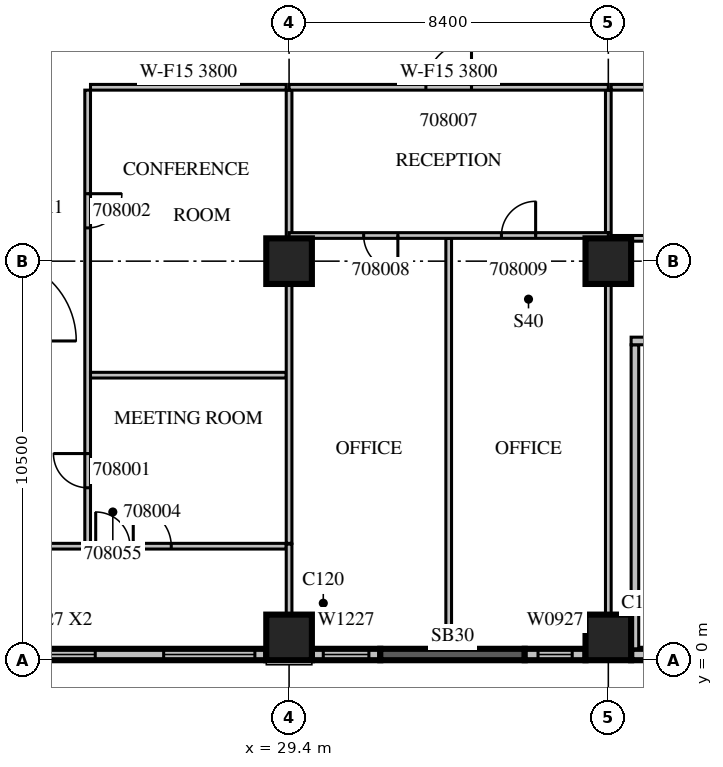
"""IFC4 building model, lengths in metres.
Left out: names, types, materials, properties, quantities, classifications, styles, units other than length and angle.
Written with IfcOpenShell. Run it as: python <this file> out.ifc"""

import sys

from ifc_helpers import new_model, si_unit, direction, frame, frame_2d, origin, origin_2d, place, context, subcontext, project, spatial, rectangle, extrude, source, transform, mapped, element, fill, save


model = new_model("IFC4")
c1 = context("Model", 3, precision=1e-05, world=origin(), true_north=direction((0.0, 1.0)))
c2 = subcontext(c1, "Body", "Model", "MODEL_VIEW")
j1 = project(units=[si_unit("LENGTHUNIT", "METRE"), si_unit("PLANEANGLEUNIT", "RADIAN")], contexts=[c1])
p1 = place(None, origin())
s1 = spatial("IfcSite", under=j1, at=p1, CompositionType="ELEMENT")
p2 = place(p1, origin())
s2 = spatial("IfcBuilding", under=s1, at=p2, CompositionType="ELEMENT")
p3 = place(p2, frame((0.0, 0.0, 44.7)))
s3 = spatial("IfcBuildingStorey", under=s2, at=p3, CompositionType="ELEMENT", Elevation=44.7)
m1 = source(origin(), c2, "Body", "SweptSolid", [
    extrude(rectangle(XDim=1.2, YDim=1.2, at=origin_2d()), origin(), (0.0, 0.0, 1.0), 4.2),
])
for number, where, z_axis, x_axis in (
    (1, (29.4, 0.6, 0.0), (0.0, 0.0, 1.0), (1.0, 0.0, 0.0)),
    (2, (37.8, 0.6, 0.0), (0.0, 0.0, 1.0), (1.0, 0.0, 0.0)),
    (3, (29.4, 10.5, 0.0), (0.0, 0.0, 1.0), (1.0, 0.0, 0.0)),
    (4, (37.8, 10.5, 0.0), (0.0, 0.0, 1.0), (1.0, 0.0, 0.0)),
):
    element("IfcColumn", number, at=place(p3, frame(where, z_axis=z_axis, x_axis=x_axis)), inside=s3, PredefinedType="COLUMN", context=c2, shape_type="MappedRepresentation", body=[
        mapped(m1, transform((0.0, 0.0, 0.0), scale=1.0)),
    ])
m2 = source(origin(), c2, "Body", "SweptSolid", [
    extrude(rectangle(XDim=7.2, YDim=0.3, at=frame_2d((3.6, 0.0))), origin(), (0.0, 0.0, 1.0), 3.8),
])
p4 = place(p3, frame((21.6, 0.15, 0.0), z_axis=(0.0, 0.0, 1.0), x_axis=(1.0, 0.0, 0.0)))
e5 = element("IfcWall", 5, at=p4, inside=s3, PredefinedType="STANDARD", context=c2, shape_type="MappedRepresentation", body=[
    mapped(m2, transform((0.0, 0.0, 0.0), scale=1.0)),
])
m3 = source(origin(), c2, "Body", "SweptSolid", [
    extrude(rectangle(XDim=2.4, YDim=2.7, at=frame_2d((1.2, 1.35))), frame((0.0, 0.16, 0.0), z_axis=(0.0, -1.0, 0.0), x_axis=(1.0, 0.0, 0.0)), (0.0, 0.0, 1.0), 0.32),
])
p5 = place(p4, frame((0.3, 0.0, 0.6)))
e6 = element("IfcOpeningElement", 6, at=p5, cuts=e5, PredefinedType="OPENING", context=c2, shape_type="MappedRepresentation", body=[
    mapped(m3, transform((0.0, 0.0, 0.0), scale=1.0)),
])
p6 = place(p4, frame((4.5, 0.0, 0.6)))
e7 = element("IfcOpeningElement", 7, at=p6, cuts=e5, PredefinedType="OPENING", context=c2, shape_type="MappedRepresentation", body=[
    mapped(m3, transform((0.0, 0.0, 0.0), scale=1.0)),
])
m4 = source(origin(), c2, "Body", "SweptSolid", [
    extrude(rectangle(XDim=1.8, YDim=0.3, at=frame_2d((0.9, 0.0))), origin(), (0.0, 0.0, 1.0), 3.8),
])
p7 = place(p3, frame((30.0, 0.15, 0.0), z_axis=(0.0, 0.0, 1.0), x_axis=(1.0, 0.0, 0.0)))
e8 = element("IfcWall", 8, at=p7, inside=s3, PredefinedType="STANDARD", context=c2, shape_type="MappedRepresentation", body=[
    mapped(m4, transform((0.0, 0.0, 0.0), scale=1.0)),
])
m5 = source(origin(), c2, "Body", "SweptSolid", [
    extrude(rectangle(XDim=1.2, YDim=2.7, at=frame_2d((0.6, 1.35))), frame((0.0, 0.16, 0.0), z_axis=(0.0, -1.0, 0.0), x_axis=(1.0, 0.0, 0.0)), (0.0, 0.0, 1.0), 0.32),
])
p8 = place(p7, frame((0.3, 0.0, 0.6)))
e9 = element("IfcOpeningElement", 9, at=p8, cuts=e8, PredefinedType="OPENING", context=c2, shape_type="MappedRepresentation", body=[
    mapped(m5, transform((0.0, 0.0, 0.0), scale=1.0)),
])
m6 = source(origin(), c2, "Body", "SweptSolid", [
    extrude(rectangle(XDim=3.8, YDim=0.3, at=frame_2d((1.9, 0.0))), origin(), (0.0, 0.0, 1.0), 3.8),
])
p9 = place(p3, frame((31.8, 0.15, 0.0), z_axis=(0.0, 0.0, 1.0), x_axis=(1.0, 0.0, 0.0)))
e10 = element("IfcWall", 10, at=p9, inside=s3, PredefinedType="SOLIDWALL", context=c2, shape_type="MappedRepresentation", body=[
    mapped(m6, transform((0.0, 0.0, 0.0), scale=1.0)),
])
m7 = source(origin(), c2, "Body", "SweptSolid", [
    extrude(rectangle(XDim=1.6, YDim=0.3, at=frame_2d((0.8, 0.0))), origin(), (0.0, 0.0, 1.0), 3.8),
])
p10 = place(p3, frame((35.6, 0.15, 0.0), z_axis=(0.0, 0.0, 1.0), x_axis=(1.0, 0.0, 0.0)))
e11 = element("IfcWall", 11, at=p10, inside=s3, PredefinedType="STANDARD", context=c2, shape_type="MappedRepresentation", body=[
    mapped(m7, transform((0.0, 0.0, 0.0), scale=1.0)),
])
m8 = source(origin(), c2, "Body", "SweptSolid", [
    extrude(rectangle(XDim=0.9, YDim=2.7, at=frame_2d((0.45, 1.35))), frame((0.0, 0.16, 0.0), z_axis=(0.0, -1.0, 0.0), x_axis=(1.0, 0.0, 0.0)), (0.0, 0.0, 1.0), 0.32),
])
p11 = place(p10, frame((0.35, 0.0, 0.6)))
e12 = element("IfcOpeningElement", 12, at=p11, cuts=e11, PredefinedType="OPENING", context=c2, shape_type="MappedRepresentation", body=[
    mapped(m8, transform((0.0, 0.0, 0.0), scale=1.0)),
])
p12 = place(p3, frame((38.4, 0.15, 0.0), z_axis=(0.0, 0.0, 1.0), x_axis=(1.0, 0.0, 0.0)))
e13 = element("IfcWall", 13, at=p12, inside=s3, PredefinedType="STANDARD", context=c2, shape_type="MappedRepresentation", body=[
    mapped(m4, transform((0.0, 0.0, 0.0), scale=1.0)),
])
m9 = source(origin(), c2, "Body", "SweptSolid", [
    extrude(rectangle(XDim=8.0, YDim=0.2, at=frame_2d((4.0, 0.0))), origin(), (0.0, 0.0, 1.0), 3.8),
])
p13 = place(p3, frame((38.5, 0.3, 0.0), z_axis=(0.0, 0.0, 1.0), x_axis=(0.0, 1.0, 0.0)))
e14 = element("IfcWall", 14, at=p13, inside=s3, PredefinedType="PARTITIONING", context=c2, shape_type="MappedRepresentation", body=[
    mapped(m9, transform((0.0, 0.0, 0.0), scale=1.0)),
])
m10 = source(origin(), c2, "Body", "SweptSolid", [
    extrude(rectangle(XDim=5.45, YDim=0.2, at=frame_2d((2.725, 0.0))), origin(), (0.0, 0.0, 1.0), 3.8),
])
p14 = place(p3, frame((38.4, 8.4, 0.0), z_axis=(0.0, 0.0, 1.0), x_axis=(1.0, 0.0, 0.0)))
e15 = element("IfcWall", 15, at=p14, inside=s3, PredefinedType="PARTITIONING", context=c2, shape_type="MappedRepresentation", body=[
    mapped(m10, transform((0.0, 0.0, 0.0), scale=1.0)),
])
m11 = source(origin(), c2, "Body", "SweptSolid", [
    extrude(rectangle(XDim=1.2, YDim=2.1, at=frame_2d((0.6, 1.05))), frame((0.0, 0.11, 0.0), z_axis=(0.0, -1.0, 0.0), x_axis=(1.0, 0.0, 0.0)), (0.0, 0.0, 1.0), 0.22),
])
p15 = place(p14, frame((0.4, 0.0, 0.0)))
e16 = element("IfcOpeningElement", 16, at=p15, cuts=e15, PredefinedType="OPENING", context=c2, shape_type="MappedRepresentation", body=[
    mapped(m11, transform((0.0, 0.0, 0.0), scale=1.0)),
])
m12 = source(origin(), c2, "Body", "SweptSolid", [
    extrude(rectangle(XDim=0.9, YDim=2.1, at=frame_2d((0.45, 1.05))), frame((0.0, 0.11, 0.0), z_axis=(0.0, -1.0, 0.0), x_axis=(1.0, 0.0, 0.0)), (0.0, 0.0, 1.0), 0.22),
])
p16 = place(p14, frame((3.25, 0.0, 0.0)))
e17 = element("IfcOpeningElement", 17, at=p16, cuts=e15, PredefinedType="OPENING", context=c2, shape_type="MappedRepresentation", body=[
    mapped(m12, transform((0.0, 0.0, 0.0), scale=1.0)),
])
m13 = source(origin(), c2, "Body", "SweptSolid", [
    extrude(rectangle(XDim=11.925, YDim=0.15, at=frame_2d((5.963, 0.0))), origin(), (0.0, 0.0, 1.0), 3.8),
])
p17 = place(p3, frame((24.1, 15.0, 0.0), z_axis=(0.0, 0.0, 1.0), x_axis=(0.0, -1.0, 0.0)))
e18 = element("IfcWall", 18, at=p17, inside=s3, PredefinedType="PARTITIONING", context=c2, shape_type="MappedRepresentation", body=[
    mapped(m13, transform((0.0, 0.0, 0.0), scale=1.0)),
])
m14 = source(origin(), c2, "Body", "SweptSolid", [
    extrude(rectangle(XDim=0.9, YDim=2.1, at=frame_2d((0.45, 1.05))), frame((0.0, 0.085, 0.0), z_axis=(0.0, -1.0, 0.0), x_axis=(1.0, 0.0, 0.0)), (0.0, 0.0, 1.0), 0.17),
])
p18 = place(p17, frame((9.562, 0.0, 0.0)))
e19 = element("IfcOpeningElement", 19, at=p18, cuts=e18, PredefinedType="OPENING", context=c2, shape_type="MappedRepresentation", body=[
    mapped(m14, transform((0.0, 0.0, 0.0), scale=1.0)),
])
p19 = place(p17, frame((2.725, 0.0, 0.0)))
e20 = element("IfcOpeningElement", 20, at=p19, cuts=e18, PredefinedType="OPENING", context=c2, shape_type="MappedRepresentation", body=[
    mapped(m14, transform((0.0, 0.0, 0.0), scale=1.0)),
])
m15 = source(origin(), c2, "Body", "SweptSolid", [
    extrude(rectangle(XDim=5.15, YDim=0.15, at=frame_2d((2.575, 0.0))), origin(), (0.0, 0.0, 1.0), 3.8),
])
for number, where, z_axis, x_axis in (
    (21, (29.325, 7.5, 0.0), (0.0, 0.0, 1.0), (-1.0, 0.0, 0.0)),
    (22, (29.325, 15.075, 0.0), (0.0, 0.0, 1.0), (-1.0, 0.0, 0.0)),
):
    element("IfcWall", number, at=place(p3, frame(where, z_axis=z_axis, x_axis=x_axis)), inside=s3, PredefinedType="PARTITIONING", context=c2, shape_type="MappedRepresentation", body=[
        mapped(m15, transform((0.0, 0.0, 0.0), scale=1.0)),
    ])
m16 = source(origin(), c2, "Body", "SweptSolid", [
    extrude(rectangle(XDim=6.826, YDim=0.15, at=frame_2d((3.413, 0.0))), origin(), (0.0, 0.0, 1.0), 3.8),
])
p20 = place(p3, frame((29.4, 3.075, 0.0), z_axis=(0.0, 0.0, 1.0), x_axis=(0.0, 1.0, 0.0)))
e23 = element("IfcWall", 23, at=p20, inside=s3, PredefinedType="PARTITIONING", context=c2, shape_type="MappedRepresentation", body=[
    mapped(m16, transform((0.0, 0.0, 0.0), scale=1.0)),
])
m17 = source(origin(), c2, "Body", "SweptSolid", [
    extrude(rectangle(XDim=3.901, YDim=0.15, at=frame_2d((1.95, 0.0))), origin(), (0.0, 0.0, 1.0), 3.8),
])
p21 = place(p3, frame((29.4, 11.099, 0.0), z_axis=(0.0, 0.0, 1.0), x_axis=(0.0, 1.0, 0.0)))
e24 = element("IfcWall", 24, at=p21, inside=s3, PredefinedType="PARTITIONING", context=c2, shape_type="MappedRepresentation", body=[
    mapped(m17, transform((0.0, 0.0, 0.0), scale=1.0)),
])
m18 = source(origin(), c2, "Body", "SweptSolid", [
    extrude(rectangle(XDim=7.125, YDim=0.15, at=frame_2d((3.562, 0.0))), origin(), (0.0, 0.0, 1.0), 3.8),
])
p22 = place(p3, frame((22.2, 3.0, 0.0), z_axis=(0.0, 0.0, 1.0), x_axis=(1.0, 0.0, 0.0)))
e25 = element("IfcWall", 25, at=p22, inside=s3, PredefinedType="PARTITIONING", context=c2, shape_type="MappedRepresentation", body=[
    mapped(m18, transform((0.0, 0.0, 0.0), scale=1.0)),
])
m19 = source(origin(), c2, "Body", "SweptSolid", [
    extrude(rectangle(XDim=1.0, YDim=2.1, at=frame_2d((0.5, 1.05))), frame((0.0, 0.085, 0.0), z_axis=(0.0, -1.0, 0.0), x_axis=(1.0, 0.0, 0.0)), (0.0, 0.0, 1.0), 0.17),
])
p23 = place(p22, frame((3.1, 0.0, 0.0)))
e26 = element("IfcOpeningElement", 26, at=p23, cuts=e25, PredefinedType="OPENING", context=c2, shape_type="MappedRepresentation", body=[
    mapped(m19, transform((0.0, 0.0, 0.0), scale=1.0)),
])
p24 = place(p22, frame((2.112, 0.0, 0.0)))
e27 = element("IfcOpeningElement", 27, at=p24, cuts=e25, PredefinedType="OPENING", context=c2, shape_type="MappedRepresentation", body=[
    mapped(m14, transform((0.0, 0.0, 0.0), scale=1.0)),
])
m20 = source(origin(), c2, "Body", "SweptSolid", [
    extrude(rectangle(XDim=6.45, YDim=0.15, at=frame_2d((3.225, 0.0))), origin(), (0.0, 0.0, 1.0), 3.8),
])
p25 = place(p3, frame((37.875, 11.1, 0.0), z_axis=(0.0, 0.0, 1.0), x_axis=(1.0, 0.0, 0.0)))
e28 = element("IfcWall", 28, at=p25, inside=s3, PredefinedType="PARTITIONING", context=c2, shape_type="MappedRepresentation", body=[
    mapped(m20, transform((0.0, 0.0, 0.0), scale=1.0)),
])
p26 = place(p3, frame((44.325, 15.075, 0.0), z_axis=(0.0, 0.0, 1.0), x_axis=(-1.0, 0.0, 0.0)))
e29 = element("IfcWall", 29, at=p26, inside=s3, PredefinedType="PARTITIONING", context=c2, shape_type="MappedRepresentation", body=[
    mapped(m20, transform((0.0, 0.0, 0.0), scale=1.0)),
])
p27 = place(p26, frame((2.812, 0.0, 0.0)))
e30 = element("IfcOpeningElement", 30, at=p27, cuts=e29, PredefinedType="OPENING", context=c2, shape_type="MappedRepresentation", body=[
    mapped(m14, transform((0.0, 0.0, 0.0), scale=1.0)),
])
m21 = source(origin(), c2, "Body", "SweptSolid", [
    extrude(rectangle(XDim=10.8, YDim=0.15, at=frame_2d((5.4, 0.0))), origin(), (0.0, 0.0, 1.0), 3.8),
])
p28 = place(p3, frame((33.6, 0.3, 0.0), z_axis=(0.0, 0.0, 1.0), x_axis=(0.0, 1.0, 0.0)))
e31 = element("IfcWall", 31, at=p28, inside=s3, PredefinedType="PARTITIONING", context=c2, shape_type="MappedRepresentation", body=[
    mapped(m21, transform((0.0, 0.0, 0.0), scale=1.0)),
])
m22 = source(origin(), c2, "Body", "SweptSolid", [
    extrude(rectangle(XDim=1.856, YDim=0.15, at=frame_2d((0.928, 0.0))), origin(), (0.0, 0.0, 1.0), 3.8),
])
p29 = place(p3, frame((29.4, 1.199, 0.0), z_axis=(0.0, 0.0, 1.0), x_axis=(0.0, 1.0, 0.0)))
e32 = element("IfcWall", 32, at=p29, inside=s3, PredefinedType="PARTITIONING", context=c2, shape_type="MappedRepresentation", body=[
    mapped(m22, transform((0.0, 0.0, 0.0), scale=1.0)),
])
m23 = source(origin(), c2, "Body", "SweptSolid", [
    extrude(rectangle(XDim=8.702, YDim=0.15, at=frame_2d((4.351, 0.0))), origin(), (0.0, 0.0, 1.0), 3.8),
])
p30 = place(p3, frame((37.8, 1.199, 0.0), z_axis=(0.0, 0.0, 1.0), x_axis=(0.0, 1.0, 0.0)))
e33 = element("IfcWall", 33, at=p30, inside=s3, PredefinedType="PARTITIONING", context=c2, shape_type="MappedRepresentation", body=[
    mapped(m23, transform((0.0, 0.0, 0.0), scale=1.0)),
])
m24 = source(origin(), c2, "Body", "SweptSolid", [
    extrude(rectangle(XDim=3.75, YDim=0.15, at=frame_2d((1.875, 0.0))), origin(), (0.0, 0.0, 1.0), 3.8),
])
p31 = place(p3, frame((37.8, 11.25, 0.0), z_axis=(0.0, 0.0, 1.0), x_axis=(0.0, 1.0, 0.0)))
e34 = element("IfcWall", 34, at=p31, inside=s3, PredefinedType="PARTITIONING", context=c2, shape_type="MappedRepresentation", body=[
    mapped(m24, transform((0.0, 0.0, 0.0), scale=1.0)),
])
m25 = source(origin(), c2, "Body", "SweptSolid", [
    extrude(rectangle(XDim=8.4, YDim=0.15, at=frame_2d((4.2, 0.0))), origin(), (0.0, 0.0, 1.0), 3.8),
])
p32 = place(p3, frame((37.8, 11.175, 0.0), z_axis=(0.0, 0.0, 1.0), x_axis=(-1.0, 0.0, 0.0)))
e35 = element("IfcWall", 35, at=p32, inside=s3, PredefinedType="PARTITIONING", context=c2, shape_type="MappedRepresentation", body=[
    mapped(m25, transform((0.0, 0.0, 0.0), scale=1.0)),
])
p33 = place(p32, frame((5.537, 0.0, 0.0)))
e36 = element("IfcOpeningElement", 36, at=p33, cuts=e35, PredefinedType="OPENING", context=c2, shape_type="MappedRepresentation", body=[
    mapped(m14, transform((0.0, 0.0, 0.0), scale=1.0)),
])
p34 = place(p32, frame((1.913, 0.0, 0.0)))
e37 = element("IfcOpeningElement", 37, at=p34, cuts=e35, PredefinedType="OPENING", context=c2, shape_type="MappedRepresentation", body=[
    mapped(m14, transform((0.0, 0.0, 0.0), scale=1.0)),
])
p35 = place(p3, frame((37.8, 15.075, 0.0), z_axis=(0.0, 0.0, 1.0), x_axis=(-1.0, 0.0, 0.0)))
e38 = element("IfcWall", 38, at=p35, inside=s3, PredefinedType="PARTITIONING", context=c2, shape_type="MappedRepresentation", body=[
    mapped(m25, transform((0.0, 0.0, 0.0), scale=1.0)),
])
m26 = source(origin(), c2, "Body", "SweptSolid", [
    extrude(rectangle(XDim=1.2, YDim=2.1, at=frame_2d((0.6, 1.05))), frame((0.0, 0.085, 0.0), z_axis=(0.0, -1.0, 0.0), x_axis=(1.0, 0.0, 0.0)), (0.0, 0.0, 1.0), 0.17),
])
p36 = place(p35, frame((3.6, 0.0, 0.0)))
e39 = element("IfcOpeningElement", 39, at=p36, cuts=e38, PredefinedType="OPENING", context=c2, shape_type="MappedRepresentation", body=[
    mapped(m26, transform((0.0, 0.0, 0.0), scale=1.0)),
])
m27 = source(origin(), c2, "Body", "SweptSolid", [
    extrude(rectangle(XDim=2.4, YDim=2.7, at=frame_2d((1.2, 1.35))), frame((0.0, 0.03, 0.0), z_axis=(0.0, -1.0, 0.0), x_axis=(1.0, 0.0, 0.0)), (0.0, 0.0, 1.0), 0.06),
])
p37 = place(p5, origin())
e40 = element("IfcWindow", 40, at=p37, inside=s3, PartitioningType="SINGLE_PANEL", PredefinedType="WINDOW", context=c2, shape_type="MappedRepresentation", body=[
    mapped(m27, transform((0.0, 0.0, 0.0), scale=1.0)),
])
fill(e6, e40)
p38 = place(p6, origin())
e41 = element("IfcWindow", 41, at=p38, inside=s3, PartitioningType="SINGLE_PANEL", PredefinedType="WINDOW", context=c2, shape_type="MappedRepresentation", body=[
    mapped(m27, transform((0.0, 0.0, 0.0), scale=1.0)),
])
fill(e7, e41)
m28 = source(origin(), c2, "Body", "SweptSolid", [
    extrude(rectangle(XDim=1.2, YDim=2.7, at=frame_2d((0.6, 1.35))), frame((0.0, 0.03, 0.0), z_axis=(0.0, -1.0, 0.0), x_axis=(1.0, 0.0, 0.0)), (0.0, 0.0, 1.0), 0.06),
])
p39 = place(p8, origin())
e42 = element("IfcWindow", 42, at=p39, inside=s3, PartitioningType="SINGLE_PANEL", PredefinedType="WINDOW", context=c2, shape_type="MappedRepresentation", body=[
    mapped(m28, transform((0.0, 0.0, 0.0), scale=1.0)),
])
fill(e9, e42)
m29 = source(origin(), c2, "Body", "SweptSolid", [
    extrude(rectangle(XDim=0.9, YDim=2.7, at=frame_2d((0.45, 1.35))), frame((0.0, 0.03, 0.0), z_axis=(0.0, -1.0, 0.0), x_axis=(1.0, 0.0, 0.0)), (0.0, 0.0, 1.0), 0.06),
])
p40 = place(p11, origin())
e43 = element("IfcWindow", 43, at=p40, inside=s3, PartitioningType="SINGLE_PANEL", PredefinedType="WINDOW", context=c2, shape_type="MappedRepresentation", body=[
    mapped(m29, transform((0.0, 0.0, 0.0), scale=1.0)),
])
fill(e12, e43)
m30 = source(origin(), c2, "Body", "SweptSolid", [
    extrude(rectangle(XDim=0.9, YDim=2.1, at=frame_2d((0.45, 1.05))), frame((0.0, 0.025, 0.0), z_axis=(0.0, -1.0, 0.0), x_axis=(1.0, 0.0, 0.0)), (0.0, 0.0, 1.0), 0.05),
])
p41 = place(p18, origin())
e44 = element("IfcDoor", 44, at=p41, inside=s3, OperationType="SINGLE_SWING_RIGHT", PredefinedType="DOOR", context=c2, shape_type="MappedRepresentation", body=[
    mapped(m30, transform((0.0, 0.0, 0.0), scale=1.0)),
])
fill(e19, e44)
p42 = place(p19, origin())
e45 = element("IfcDoor", 45, at=p42, inside=s3, OperationType="SINGLE_SWING_LEFT", PredefinedType="DOOR", context=c2, shape_type="MappedRepresentation", body=[
    mapped(m30, transform((0.0, 0.0, 0.0), scale=1.0)),
])
fill(e20, e45)
m31 = source(origin(), c2, "Body", "SweptSolid", [
    extrude(rectangle(XDim=1.0, YDim=2.1, at=frame_2d((0.5, 1.05))), frame((0.0, 0.025, 0.0), z_axis=(0.0, -1.0, 0.0), x_axis=(1.0, 0.0, 0.0)), (0.0, 0.0, 1.0), 0.05),
])
p43 = place(p23, origin())
e46 = element("IfcDoor", 46, at=p43, inside=s3, OperationType="SINGLE_SWING_LEFT", PredefinedType="DOOR", context=c2, shape_type="MappedRepresentation", body=[
    mapped(m31, transform((0.0, 0.0, 0.0), scale=1.0)),
])
fill(e26, e46)
m32 = source(origin(), c2, "Body", "SweptSolid", [
    extrude(rectangle(XDim=1.2, YDim=2.1, at=frame_2d((0.6, 1.05))), frame((0.0, 0.025, 0.0), z_axis=(0.0, -1.0, 0.0), x_axis=(1.0, 0.0, 0.0)), (0.0, 0.0, 1.0), 0.05),
])
p44 = place(p36, origin())
e47 = element("IfcDoor", 47, at=p44, inside=s3, OperationType="SINGLE_SWING_RIGHT", PredefinedType="DOOR", context=c2, shape_type="MappedRepresentation", body=[
    mapped(m32, transform((0.0, 0.0, 0.0), scale=1.0)),
])
fill(e39, e47)
p45 = place(p33, origin())
e48 = element("IfcDoor", 48, at=p45, inside=s3, OperationType="SINGLE_SWING_LEFT", PredefinedType="DOOR", context=c2, shape_type="MappedRepresentation", body=[
    mapped(m30, transform((0.0, 0.0, 0.0), scale=1.0)),
])
fill(e36, e48)
p46 = place(p34, origin())
e49 = element("IfcDoor", 49, at=p46, inside=s3, OperationType="SINGLE_SWING_RIGHT", PredefinedType="DOOR", context=c2, shape_type="MappedRepresentation", body=[
    mapped(m30, transform((0.0, 0.0, 0.0), scale=1.0)),
])
fill(e37, e49)
p47 = place(p24, origin())
e50 = element("IfcDoor", 50, at=p47, inside=s3, OperationType="SINGLE_SWING_LEFT", PredefinedType="DOOR", context=c2, shape_type="MappedRepresentation", body=[
    mapped(m30, transform((0.0, 0.0, 0.0), scale=1.0)),
])
fill(e27, e50)
save(model, sys.argv[1])
